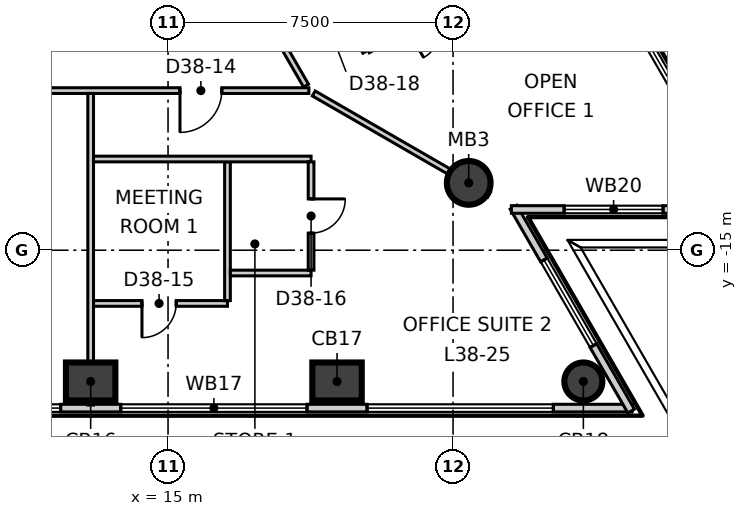
"""IFC4 building model, lengths in metres.
Left out: names, types, materials, properties, quantities, classifications, styles, units other than length and angle.
Written with IfcOpenShell. Run it as: python <this file> out.ifc"""

import sys

from ifc_helpers import new_model, si_unit, direction, frame, frame_2d, origin, origin_2d, place, context, subcontext, project, spatial, rectangle, circle, extrude, element, fill, save


model = new_model("IFC4")
c1 = context("Model", 3, precision=1e-05, world=origin(), true_north=direction((0.0, 1.0)))
c2 = subcontext(c1, "Body", "Model", "MODEL_VIEW")
j1 = project(units=[si_unit("LENGTHUNIT", "METRE"), si_unit("PLANEANGLEUNIT", "RADIAN")], contexts=[c1])
p1 = place(None, origin())
s1 = spatial("IfcSite", under=j1, at=p1, CompositionType="ELEMENT")
p2 = place(p1, origin())
s2 = spatial("IfcBuilding", under=s1, at=p2, CompositionType="ELEMENT")
p3 = place(p2, frame((0.0, 0.0, 164.3)))
s3 = spatial("IfcBuildingStorey", under=s2, at=p3, CompositionType="ELEMENT", Elevation=164.3)
for number, where, z_axis, x_axis in (
    (1, (12.964, -18.454, -0.3), (0.0, 0.0, 1.0), (1.0, 0.0, 0.0)),
    (2, (19.447, -18.454, -0.3), (0.0, 0.0, 1.0), (1.0, 0.0, 0.0)),
):
    element("IfcColumn", number, at=place(p3, frame(where, z_axis=z_axis, x_axis=x_axis)), inside=s3, PredefinedType="COLUMN", context=c2, shape_type="SweptSolid", body=[
        extrude(rectangle(XDim=1.3, YDim=1.0, at=origin_2d()), origin(), (0.0, 0.0, 1.0), 4.0),
    ])
p4 = place(p3, frame((25.929, -18.454, -0.3), z_axis=(0.0, 0.0, 1.0), x_axis=(1.0, 0.0, 0.0)))
e3 = element("IfcColumn", 3, at=p4, inside=s3, PredefinedType="COLUMN", context=c2, shape_type="SweptSolid", body=[
    extrude(circle(Radius=0.5, at=origin_2d()), origin(), (0.0, 0.0, 1.0), 4.0),
])
p5 = place(p3, frame((22.912, -13.228, -0.3), z_axis=(0.0, 0.0, 1.0), x_axis=(1.0, 0.0, 0.0)))
e4 = element("IfcColumn", 4, at=p5, inside=s3, PredefinedType="COLUMN", context=c2, shape_type="SweptSolid", body=[
    extrude(circle(Radius=0.575, at=origin_2d()), origin(), (0.0, 0.0, 1.0), 4.0),
])
p6 = place(p3, frame((-27.232, -19.154, 0.0), z_axis=(0.0, 0.0, 1.0), x_axis=(1.0, 0.0, 0.0)))
e5 = element("IfcWall", 5, at=p6, inside=s3, PredefinedType="ELEMENTEDWALL", context=c2, shape_type="SweptSolid", body=[
    extrude(rectangle(XDim=54.444, YDim=0.2, at=frame_2d((27.222, 0.0))), origin(), (0.0, 0.0, 1.0), 3.7),
])
p7 = place(p6, frame((2.094, 0.0, 0.9)))
e6 = element("IfcOpeningElement", 6, at=p7, cuts=e5, PredefinedType="OPENING", context=c2, shape_type="SweptSolid", body=[
    extrude(rectangle(XDim=4.9, YDim=2.5, at=frame_2d((2.45, 1.25))), frame((0.0, 0.11, 0.0), z_axis=(0.0, -1.0, 0.0), x_axis=(1.0, 0.0, 0.0)), (0.0, 0.0, 1.0), 0.22),
])
p8 = place(p6, frame((8.576, 0.0, 0.9)))
e7 = element("IfcOpeningElement", 7, at=p8, cuts=e5, PredefinedType="OPENING", context=c2, shape_type="SweptSolid", body=[
    extrude(rectangle(XDim=4.9, YDim=2.5, at=frame_2d((2.45, 1.25))), frame((0.0, 0.11, 0.0), z_axis=(0.0, -1.0, 0.0), x_axis=(1.0, 0.0, 0.0)), (0.0, 0.0, 1.0), 0.22),
])
p9 = place(p6, frame((15.059, 0.0, 0.9)))
e8 = element("IfcOpeningElement", 8, at=p9, cuts=e5, PredefinedType="OPENING", context=c2, shape_type="SweptSolid", body=[
    extrude(rectangle(XDim=4.9, YDim=2.5, at=frame_2d((2.45, 1.25))), frame((0.0, 0.11, 0.0), z_axis=(0.0, -1.0, 0.0), x_axis=(1.0, 0.0, 0.0)), (0.0, 0.0, 1.0), 0.22),
])
p10 = place(p6, frame((21.541, 0.0, 0.9)))
e9 = element("IfcOpeningElement", 9, at=p10, cuts=e5, PredefinedType="OPENING", context=c2, shape_type="SweptSolid", body=[
    extrude(rectangle(XDim=4.9, YDim=2.5, at=frame_2d((2.45, 1.25))), frame((0.0, 0.11, 0.0), z_axis=(0.0, -1.0, 0.0), x_axis=(1.0, 0.0, 0.0)), (0.0, 0.0, 1.0), 0.22),
])
p11 = place(p6, frame((28.023, 0.0, 0.9)))
e10 = element("IfcOpeningElement", 10, at=p11, cuts=e5, PredefinedType="OPENING", context=c2, shape_type="SweptSolid", body=[
    extrude(rectangle(XDim=4.9, YDim=2.5, at=frame_2d((2.45, 1.25))), frame((0.0, 0.11, 0.0), z_axis=(0.0, -1.0, 0.0), x_axis=(1.0, 0.0, 0.0)), (0.0, 0.0, 1.0), 0.22),
])
p12 = place(p6, frame((34.505, 0.0, 0.9)))
e11 = element("IfcOpeningElement", 11, at=p12, cuts=e5, PredefinedType="OPENING", context=c2, shape_type="SweptSolid", body=[
    extrude(rectangle(XDim=4.9, YDim=2.5, at=frame_2d((2.45, 1.25))), frame((0.0, 0.11, 0.0), z_axis=(0.0, -1.0, 0.0), x_axis=(1.0, 0.0, 0.0)), (0.0, 0.0, 1.0), 0.22),
])
p13 = place(p6, frame((40.988, 0.0, 0.9)))
e12 = element("IfcOpeningElement", 12, at=p13, cuts=e5, PredefinedType="OPENING", context=c2, shape_type="SweptSolid", body=[
    extrude(rectangle(XDim=4.9, YDim=2.5, at=frame_2d((2.45, 1.25))), frame((0.0, 0.11, 0.0), z_axis=(0.0, -1.0, 0.0), x_axis=(1.0, 0.0, 0.0)), (0.0, 0.0, 1.0), 0.22),
])
p14 = place(p6, frame((47.47, 0.0, 0.9)))
e13 = element("IfcOpeningElement", 13, at=p14, cuts=e5, PredefinedType="OPENING", context=c2, shape_type="SweptSolid", body=[
    extrude(rectangle(XDim=4.9, YDim=2.5, at=frame_2d((2.45, 1.25))), frame((0.0, 0.11, 0.0), z_axis=(0.0, -1.0, 0.0), x_axis=(1.0, 0.0, 0.0)), (0.0, 0.0, 1.0), 0.22),
])
p15 = place(p3, frame((27.187, -19.232, 0.0), z_axis=(0.0, 0.0, 1.0), x_axis=(-0.499932836684, 0.86606417707, 0.0)))
e14 = element("IfcWall", 14, at=p15, inside=s3, PredefinedType="ELEMENTEDWALL", context=c2, shape_type="SweptSolid", body=[
    extrude(rectangle(XDim=6.195, YDim=0.2, at=frame_2d((3.097, 0.0))), origin(), (0.0, 0.0, 1.0), 3.7),
])
p16 = place(p15, frame((1.99, 0.0, 0.9)))
e15 = element("IfcOpeningElement", 15, at=p16, cuts=e14, PredefinedType="OPENING", context=c2, shape_type="SweptSolid", body=[
    extrude(rectangle(XDim=2.6, YDim=2.5, at=frame_2d((1.3, 1.25))), frame((0.0, 0.11, 0.0), z_axis=(0.0, -1.0, 0.0), x_axis=(1.0, 0.0, 0.0)), (0.0, 0.0, 1.0), 0.22),
])
p17 = place(p3, frame((24.035, -13.928, 0.0), z_axis=(0.0, 0.0, 1.0), x_axis=(1.0, 0.0, 0.0)))
e16 = element("IfcWall", 16, at=p17, inside=s3, PredefinedType="ELEMENTEDWALL", context=c2, shape_type="SweptSolid", body=[
    extrude(rectangle(XDim=6.194, YDim=0.2, at=frame_2d((3.097, 0.0))), origin(), (0.0, 0.0, 1.0), 3.7),
])
p18 = place(p17, frame((1.39, 0.0, 0.9)))
e17 = element("IfcOpeningElement", 17, at=p18, cuts=e16, PredefinedType="OPENING", context=c2, shape_type="SweptSolid", body=[
    extrude(rectangle(XDim=2.6, YDim=2.5, at=frame_2d((1.3, 1.25))), frame((0.0, 0.11, 0.0), z_axis=(0.0, -1.0, 0.0), x_axis=(1.0, 0.0, 0.0)), (0.0, 0.0, 1.0), 0.22),
])
p19 = place(p3, frame((30.204, -14.006, 0.0), z_axis=(0.0, 0.0, 1.0), x_axis=(-0.500008017777, 0.866020774669, 0.0)))
e18 = element("IfcWall", 18, at=p19, inside=s3, PredefinedType="ELEMENTEDWALL", context=c2, shape_type="SweptSolid", body=[
    extrude(rectangle(XDim=54.443, YDim=0.2, at=frame_2d((27.222, 0.0))), origin(), (0.0, 0.0, 1.0), 3.7),
])
p20 = place(p19, frame((2.094, 0.0, 0.9)))
e19 = element("IfcOpeningElement", 19, at=p20, cuts=e18, PredefinedType="OPENING", context=c2, shape_type="SweptSolid", body=[
    extrude(rectangle(XDim=4.9, YDim=2.5, at=frame_2d((2.45, 1.25))), frame((0.0, 0.11, 0.0), z_axis=(0.0, -1.0, 0.0), x_axis=(1.0, 0.0, 0.0)), (0.0, 0.0, 1.0), 0.22),
])
p21 = place(p19, frame((8.576, 0.0, 0.9)))
e20 = element("IfcOpeningElement", 20, at=p21, cuts=e18, PredefinedType="OPENING", context=c2, shape_type="SweptSolid", body=[
    extrude(rectangle(XDim=4.9, YDim=2.5, at=frame_2d((2.45, 1.25))), frame((0.0, 0.11, 0.0), z_axis=(0.0, -1.0, 0.0), x_axis=(1.0, 0.0, 0.0)), (0.0, 0.0, 1.0), 0.22),
])
p22 = place(p19, frame((15.058, 0.0, 0.9)))
e21 = element("IfcOpeningElement", 21, at=p22, cuts=e18, PredefinedType="OPENING", context=c2, shape_type="SweptSolid", body=[
    extrude(rectangle(XDim=4.9, YDim=2.5, at=frame_2d((2.45, 1.25))), frame((0.0, 0.11, 0.0), z_axis=(0.0, -1.0, 0.0), x_axis=(1.0, 0.0, 0.0)), (0.0, 0.0, 1.0), 0.22),
])
p23 = place(p19, frame((21.54, 0.0, 0.9)))
e22 = element("IfcOpeningElement", 22, at=p23, cuts=e18, PredefinedType="OPENING", context=c2, shape_type="SweptSolid", body=[
    extrude(rectangle(XDim=4.9, YDim=2.5, at=frame_2d((2.45, 1.25))), frame((0.0, 0.11, 0.0), z_axis=(0.0, -1.0, 0.0), x_axis=(1.0, 0.0, 0.0)), (0.0, 0.0, 1.0), 0.22),
])
p24 = place(p19, frame((28.023, 0.0, 0.9)))
e23 = element("IfcOpeningElement", 23, at=p24, cuts=e18, PredefinedType="OPENING", context=c2, shape_type="SweptSolid", body=[
    extrude(rectangle(XDim=4.9, YDim=2.5, at=frame_2d((2.45, 1.25))), frame((0.0, 0.11, 0.0), z_axis=(0.0, -1.0, 0.0), x_axis=(1.0, 0.0, 0.0)), (0.0, 0.0, 1.0), 0.22),
])
p25 = place(p19, frame((34.505, 0.0, 0.9)))
e24 = element("IfcOpeningElement", 24, at=p25, cuts=e18, PredefinedType="OPENING", context=c2, shape_type="SweptSolid", body=[
    extrude(rectangle(XDim=4.9, YDim=2.5, at=frame_2d((2.45, 1.25))), frame((0.0, 0.11, 0.0), z_axis=(0.0, -1.0, 0.0), x_axis=(1.0, 0.0, 0.0)), (0.0, 0.0, 1.0), 0.22),
])
p26 = place(p19, frame((40.987, 0.0, 0.9)))
e25 = element("IfcOpeningElement", 25, at=p26, cuts=e18, PredefinedType="OPENING", context=c2, shape_type="SweptSolid", body=[
    extrude(rectangle(XDim=4.9, YDim=2.5, at=frame_2d((2.45, 1.25))), frame((0.0, 0.11, 0.0), z_axis=(0.0, -1.0, 0.0), x_axis=(1.0, 0.0, 0.0)), (0.0, 0.0, 1.0), 0.22),
])
p27 = place(p19, frame((47.469, 0.0, 0.9)))
e26 = element("IfcOpeningElement", 26, at=p27, cuts=e18, PredefinedType="OPENING", context=c2, shape_type="SweptSolid", body=[
    extrude(rectangle(XDim=4.9, YDim=2.5, at=frame_2d((2.45, 1.25))), frame((0.0, 0.11, 0.0), z_axis=(0.0, -1.0, 0.0), x_axis=(1.0, 0.0, 0.0)), (0.0, 0.0, 1.0), 0.22),
])
p28 = place(p3, frame((-5.581, -10.8, 0.0), z_axis=(0.0, 0.0, 1.0), x_axis=(1.0, 0.0, 0.0)))
e27 = element("IfcWall", 27, at=p28, inside=s3, PredefinedType="PARTITIONING", context=c2, shape_type="SweptSolid", body=[
    extrude(rectangle(XDim=24.287, YDim=0.15, at=frame_2d((12.144, 0.0))), origin(), (0.0, 0.0, 1.0), 3.7),
])
p29 = place(p28, frame((5.549, 0.0, 0.0)))
e28 = element("IfcOpeningElement", 28, at=p29, cuts=e27, PredefinedType="OPENING", context=c2, shape_type="SweptSolid", body=[
    extrude(rectangle(XDim=1.0, YDim=2.1, at=frame_2d((0.5, 1.05))), frame((0.0, 0.085, 0.0), z_axis=(0.0, -1.0, 0.0), x_axis=(1.0, 0.0, 0.0)), (0.0, 0.0, 1.0), 0.17),
])
p30 = place(p28, frame((14.813, 0.0, 0.0)))
e29 = element("IfcOpeningElement", 29, at=p30, cuts=e27, PredefinedType="OPENING", context=c2, shape_type="SweptSolid", body=[
    extrude(rectangle(XDim=1.0, YDim=2.1, at=frame_2d((0.5, 1.05))), frame((0.0, 0.085, 0.0), z_axis=(0.0, -1.0, 0.0), x_axis=(1.0, 0.0, 0.0)), (0.0, 0.0, 1.0), 0.17),
])
p31 = place(p28, frame((20.895, 0.0, 0.0)))
e30 = element("IfcOpeningElement", 30, at=p31, cuts=e27, PredefinedType="OPENING", context=c2, shape_type="SweptSolid", body=[
    extrude(rectangle(XDim=1.1, YDim=2.1, at=frame_2d((0.55, 1.05))), frame((0.0, 0.085, 0.0), z_axis=(0.0, -1.0, 0.0), x_axis=(1.0, 0.0, 0.0)), (0.0, 0.0, 1.0), 0.17),
])
p32 = place(p3, frame((18.835, -10.875, 0.0), z_axis=(0.0, 0.0, 1.0), x_axis=(0.866012362072, -0.500022588228, 0.0)))
e31 = element("IfcWall", 31, at=p32, inside=s3, PredefinedType="PARTITIONING", context=c2, shape_type="SweptSolid", body=[
    extrude(rectangle(XDim=5.328, YDim=0.15, at=frame_2d((2.664, 0.0))), origin(), (0.0, 0.0, 1.0), 3.2),
])
p33 = place(p3, frame((9.804, 4.62, 0.0), z_axis=(0.0, 0.0, 1.0), x_axis=(0.500000173646, -0.86602530353, 0.0)))
e32 = element("IfcWall", 32, at=p33, inside=s3, PredefinedType="PARTITIONING", context=c2, shape_type="SweptSolid", body=[
    extrude(rectangle(XDim=17.654, YDim=0.15, at=frame_2d((8.827, 0.0))), origin(), (0.0, 0.0, 1.0), 3.7),
])
p34 = place(p33, frame((14.354, 0.0, 0.0)))
e33 = element("IfcOpeningElement", 33, at=p34, cuts=e32, PredefinedType="OPENING", context=c2, shape_type="SweptSolid", body=[
    extrude(rectangle(XDim=1.1, YDim=2.1, at=frame_2d((0.55, 1.05))), frame((0.0, 0.085, 0.0), z_axis=(0.0, -1.0, 0.0), x_axis=(1.0, 0.0, 0.0)), (0.0, 0.0, 1.0), 0.17),
])
p35 = place(p33, frame((10.014, 0.0, 0.0)))
e34 = element("IfcOpeningElement", 34, at=p35, cuts=e32, PredefinedType="OPENING", context=c2, shape_type="SweptSolid", body=[
    extrude(rectangle(XDim=0.9, YDim=2.1, at=frame_2d((0.45, 1.05))), frame((0.0, 0.085, 0.0), z_axis=(0.0, -1.0, 0.0), x_axis=(1.0, 0.0, 0.0)), (0.0, 0.0, 1.0), 0.17),
])
p36 = place(p33, frame((6.814, 0.0, 0.0)))
e35 = element("IfcOpeningElement", 35, at=p36, cuts=e32, PredefinedType="OPENING", context=c2, shape_type="SweptSolid", body=[
    extrude(rectangle(XDim=0.9, YDim=2.1, at=frame_2d((0.45, 1.05))), frame((0.0, 0.085, 0.0), z_axis=(0.0, -1.0, 0.0), x_axis=(1.0, 0.0, 0.0)), (0.0, 0.0, 1.0), 0.17),
])
p37 = place(p33, frame((4.014, 0.0, 0.0)))
e36 = element("IfcOpeningElement", 36, at=p37, cuts=e32, PredefinedType="OPENING", context=c2, shape_type="SweptSolid", body=[
    extrude(rectangle(XDim=1.0, YDim=2.1, at=frame_2d((0.5, 1.05))), frame((0.0, 0.085, 0.0), z_axis=(0.0, -1.0, 0.0), x_axis=(1.0, 0.0, 0.0)), (0.0, 0.0, 1.0), 0.17),
])
p38 = place(p3, frame((12.964, -19.074, 0.0), z_axis=(0.0, 0.0, 1.0), x_axis=(0.0, 1.0, 0.0)))
e37 = element("IfcWall", 37, at=p38, inside=s3, PredefinedType="PARTITIONING", context=c2, shape_type="SweptSolid", body=[
    extrude(rectangle(XDim=8.199, YDim=0.15, at=frame_2d((4.1, 0.0))), origin(), (0.0, 0.0, 1.0), 3.7),
])
p39 = place(p3, frame((13.039, -16.4, 0.0), z_axis=(0.0, 0.0, 1.0), x_axis=(1.0, 0.0, 0.0)))
e38 = element("IfcWall", 38, at=p39, inside=s3, PredefinedType="PARTITIONING", context=c2, shape_type="SweptSolid", body=[
    extrude(rectangle(XDim=3.525, YDim=0.15, at=frame_2d((1.762, 0.0))), origin(), (0.0, 0.0, 1.0), 3.7),
])
p40 = place(p39, frame((1.275, 0.0, 0.0)))
e39 = element("IfcOpeningElement", 39, at=p40, cuts=e38, PredefinedType="OPENING", context=c2, shape_type="SweptSolid", body=[
    extrude(rectangle(XDim=0.9, YDim=2.1, at=frame_2d((0.45, 1.05))), frame((0.0, 0.085, 0.0), z_axis=(0.0, -1.0, 0.0), x_axis=(1.0, 0.0, 0.0)), (0.0, 0.0, 1.0), 0.17),
])
p41 = place(p3, frame((16.564, -16.325, 0.0), z_axis=(0.0, 0.0, 1.0), x_axis=(0.0, 1.0, 0.0)))
e40 = element("IfcWall", 40, at=p41, inside=s3, PredefinedType="PARTITIONING", context=c2, shape_type="SweptSolid", body=[
    extrude(rectangle(XDim=3.65, YDim=0.15, at=frame_2d((1.825, 0.0))), origin(), (0.0, 0.0, 1.0), 3.7),
])
p42 = place(p3, frame((13.039, -12.6, 0.0), z_axis=(0.0, 0.0, 1.0), x_axis=(1.0, 0.0, 0.0)))
e41 = element("IfcWall", 41, at=p42, inside=s3, PredefinedType="PARTITIONING", context=c2, shape_type="SweptSolid", body=[
    extrude(rectangle(XDim=5.725, YDim=0.15, at=frame_2d((2.862, 0.0))), origin(), (0.0, 0.0, 1.0), 3.7),
])
p43 = place(p3, frame((16.639, -15.6, 0.0), z_axis=(0.0, 0.0, 1.0), x_axis=(1.0, 0.0, 0.0)))
e42 = element("IfcWall", 42, at=p43, inside=s3, PredefinedType="PARTITIONING", context=c2, shape_type="SweptSolid", body=[
    extrude(rectangle(XDim=2.125, YDim=0.15, at=frame_2d((1.062, 0.0))), origin(), (0.0, 0.0, 1.0), 3.7),
])
p44 = place(p3, frame((18.764, -15.525, 0.0), z_axis=(0.0, 0.0, 1.0), x_axis=(0.0, 1.0, 0.0)))
e43 = element("IfcWall", 43, at=p44, inside=s3, PredefinedType="PARTITIONING", context=c2, shape_type="SweptSolid", body=[
    extrude(rectangle(XDim=2.85, YDim=0.15, at=frame_2d((1.425, 0.0))), origin(), (0.0, 0.0, 1.0), 3.7),
])
p45 = place(p44, frame((0.975, 0.0, 0.0)))
e44 = element("IfcOpeningElement", 44, at=p45, cuts=e43, PredefinedType="OPENING", context=c2, shape_type="SweptSolid", body=[
    extrude(rectangle(XDim=0.9, YDim=2.1, at=frame_2d((0.45, 1.05))), frame((0.0, 0.085, 0.0), z_axis=(0.0, -1.0, 0.0), x_axis=(1.0, 0.0, 0.0)), (0.0, 0.0, 1.0), 0.17),
])
p46 = place(p3, frame((17.432, -4.993, 0.0), z_axis=(0.0, 0.0, 1.0), x_axis=(0.499931554694, -0.866064917094, 0.0)))
e45 = element("IfcWall", 45, at=p46, inside=s3, PredefinedType="PARTITIONING", context=c2, shape_type="SweptSolid", body=[
    extrude(rectangle(XDim=5.525, YDim=0.15, at=frame_2d((2.763, 0.0))), origin(), (0.0, 0.0, 1.0), 3.7),
])
p47 = place(p46, frame((0.875, 0.0, 0.0)))
e46 = element("IfcOpeningElement", 46, at=p47, cuts=e45, PredefinedType="OPENING", context=c2, shape_type="SweptSolid", body=[
    extrude(rectangle(XDim=0.9, YDim=2.1, at=frame_2d((0.45, 1.05))), frame((0.0, 0.085, 0.0), z_axis=(0.0, -1.0, 0.0), x_axis=(1.0, 0.0, 0.0)), (0.0, 0.0, 1.0), 0.17),
])
p48 = place(p3, frame((20.259, -9.74, 0.0), z_axis=(0.0, 0.0, 1.0), x_axis=(0.866053003207, 0.499952193351, 0.0)))
e47 = element("IfcWall", 47, at=p48, inside=s3, PredefinedType="PARTITIONING", context=c2, shape_type="SweptSolid", body=[
    extrude(rectangle(XDim=3.25, YDim=0.15, at=frame_2d((1.625, 0.0))), origin(), (0.0, 0.0, 1.0), 3.7),
])
p49 = place(p48, frame((1.175, 0.0, 0.0)))
e48 = element("IfcOpeningElement", 48, at=p49, cuts=e47, PredefinedType="OPENING", context=c2, shape_type="SweptSolid", body=[
    extrude(rectangle(XDim=0.9, YDim=2.1, at=frame_2d((0.45, 1.05))), frame((0.0, 0.085, 0.0), z_axis=(0.0, -1.0, 0.0), x_axis=(1.0, 0.0, 0.0)), (0.0, 0.0, 1.0), 0.17),
])
p50 = place(p12, origin())
e49 = element("IfcWindow", 49, at=p50, inside=s3, PartitioningType="SINGLE_PANEL", PredefinedType="WINDOW", context=c2, shape_type="SweptSolid", body=[
    extrude(rectangle(XDim=4.9, YDim=2.5, at=frame_2d((2.45, 1.25))), frame((0.0, 0.03, 0.0), z_axis=(0.0, -1.0, 0.0), x_axis=(1.0, 0.0, 0.0)), (0.0, 0.0, 1.0), 0.06),
])
fill(e11, e49)
p51 = place(p13, origin())
e50 = element("IfcWindow", 50, at=p51, inside=s3, PartitioningType="SINGLE_PANEL", PredefinedType="WINDOW", context=c2, shape_type="SweptSolid", body=[
    extrude(rectangle(XDim=4.9, YDim=2.5, at=frame_2d((2.45, 1.25))), frame((0.0, 0.03, 0.0), z_axis=(0.0, -1.0, 0.0), x_axis=(1.0, 0.0, 0.0)), (0.0, 0.0, 1.0), 0.06),
])
fill(e12, e50)
p52 = place(p14, origin())
e51 = element("IfcWindow", 51, at=p52, inside=s3, PartitioningType="SINGLE_PANEL", PredefinedType="WINDOW", context=c2, shape_type="SweptSolid", body=[
    extrude(rectangle(XDim=4.9, YDim=2.5, at=frame_2d((2.45, 1.25))), frame((0.0, 0.03, 0.0), z_axis=(0.0, -1.0, 0.0), x_axis=(1.0, 0.0, 0.0)), (0.0, 0.0, 1.0), 0.06),
])
fill(e13, e51)
p53 = place(p16, origin())
e52 = element("IfcWindow", 52, at=p53, inside=s3, PartitioningType="SINGLE_PANEL", PredefinedType="WINDOW", context=c2, shape_type="SweptSolid", body=[
    extrude(rectangle(XDim=2.6, YDim=2.5, at=frame_2d((1.3, 1.25))), frame((0.0, 0.03, 0.0), z_axis=(0.0, -1.0, 0.0), x_axis=(1.0, 0.0, 0.0)), (0.0, 0.0, 1.0), 0.06),
])
fill(e15, e52)
p54 = place(p18, origin())
e53 = element("IfcWindow", 53, at=p54, inside=s3, PartitioningType="SINGLE_PANEL", PredefinedType="WINDOW", context=c2, shape_type="SweptSolid", body=[
    extrude(rectangle(XDim=2.6, YDim=2.5, at=frame_2d((1.3, 1.25))), frame((0.0, 0.03, 0.0), z_axis=(0.0, -1.0, 0.0), x_axis=(1.0, 0.0, 0.0)), (0.0, 0.0, 1.0), 0.06),
])
fill(e17, e53)
p55 = place(p20, origin())
e54 = element("IfcWindow", 54, at=p55, inside=s3, PartitioningType="SINGLE_PANEL", PredefinedType="WINDOW", context=c2, shape_type="SweptSolid", body=[
    extrude(rectangle(XDim=4.9, YDim=2.5, at=frame_2d((2.45, 1.25))), frame((0.0, 0.03, 0.0), z_axis=(0.0, -1.0, 0.0), x_axis=(1.0, 0.0, 0.0)), (0.0, 0.0, 1.0), 0.06),
])
fill(e19, e54)
p56 = place(p31, origin())
e55 = element("IfcDoor", 55, at=p56, inside=s3, OperationType="SINGLE_SWING_LEFT", PredefinedType="DOOR", context=c2, shape_type="SweptSolid", body=[
    extrude(rectangle(XDim=1.1, YDim=2.1, at=frame_2d((0.55, 1.05))), frame((0.0, 0.025, 0.0), z_axis=(0.0, -1.0, 0.0), x_axis=(1.0, 0.0, 0.0)), (0.0, 0.0, 1.0), 0.05),
])
fill(e30, e55)
p57 = place(p40, origin())
e56 = element("IfcDoor", 56, at=p57, inside=s3, OperationType="SINGLE_SWING_LEFT", PredefinedType="DOOR", context=c2, shape_type="SweptSolid", body=[
    extrude(rectangle(XDim=0.9, YDim=2.1, at=frame_2d((0.45, 1.05))), frame((0.0, 0.025, 0.0), z_axis=(0.0, -1.0, 0.0), x_axis=(1.0, 0.0, 0.0)), (0.0, 0.0, 1.0), 0.05),
])
fill(e39, e56)
p58 = place(p45, origin())
e57 = element("IfcDoor", 57, at=p58, inside=s3, OperationType="SINGLE_SWING_RIGHT", PredefinedType="DOOR", context=c2, shape_type="SweptSolid", body=[
    extrude(rectangle(XDim=0.9, YDim=2.1, at=frame_2d((0.45, 1.05))), frame((0.0, 0.025, 0.0), z_axis=(0.0, -1.0, 0.0), x_axis=(1.0, 0.0, 0.0)), (0.0, 0.0, 1.0), 0.05),
])
fill(e44, e57)
save(model, sys.argv[1])
